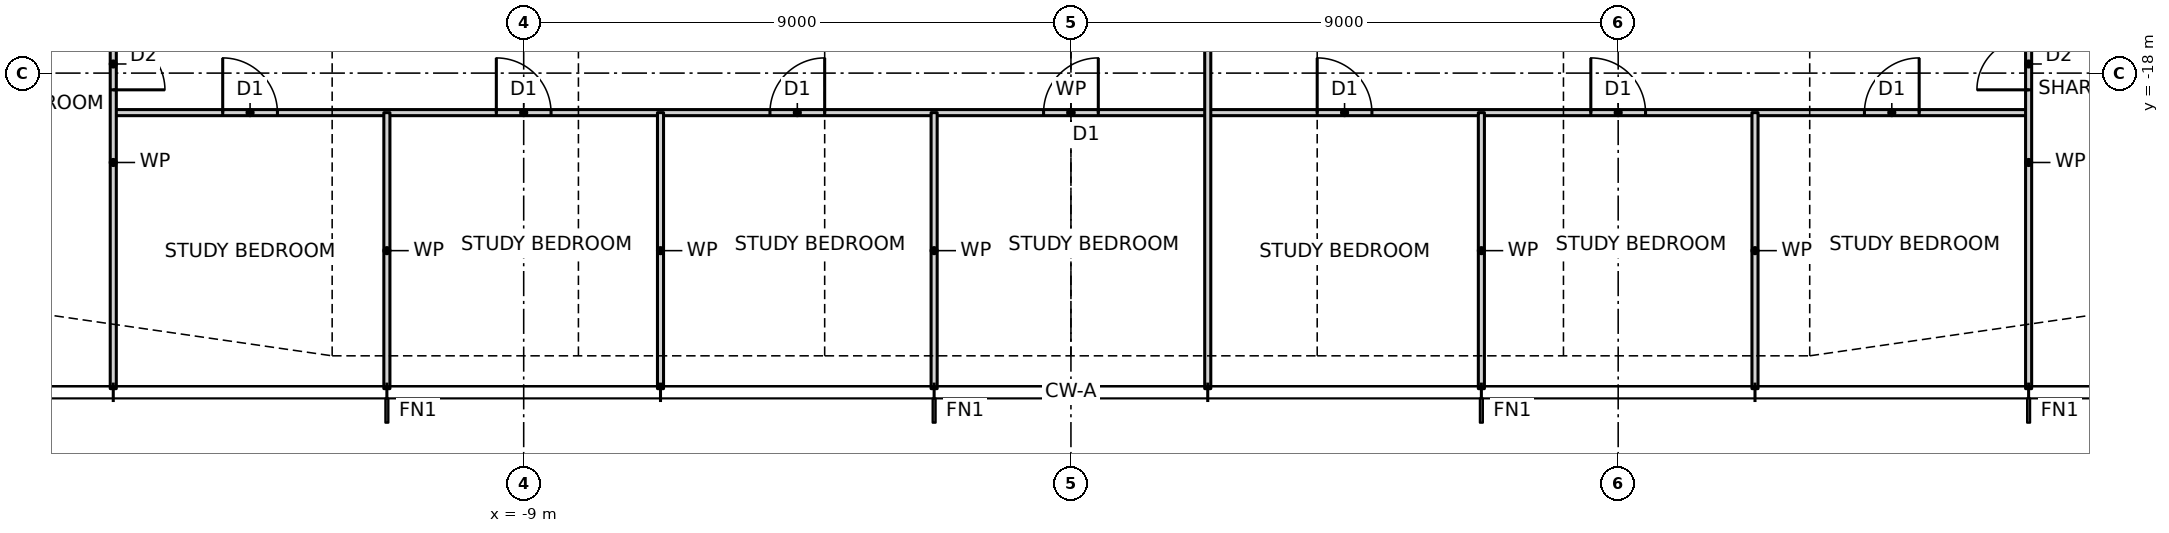
"""IFC4 building model, lengths in metres.
Left out: names, types, materials, properties, quantities, classifications, styles, units other than length and angle.
Written with IfcOpenShell. Run it as: python <this file> out.ifc"""

import sys

from ifc_helpers import new_model, si_unit, direction, frame, frame_2d, origin, place, context, subcontext, project, spatial, rectangle, extrude, element, fill, save


model = new_model("IFC4")
c1 = context("Model", 3, precision=1e-05, world=origin(), true_north=direction((0.0, 1.0)))
c2 = subcontext(c1, "Body", "Model", "MODEL_VIEW")
j1 = project(units=[si_unit("LENGTHUNIT", "METRE"), si_unit("PLANEANGLEUNIT", "RADIAN")], contexts=[c1])
p1 = place(None, origin())
s1 = spatial("IfcSite", under=j1, at=p1, CompositionType="ELEMENT")
p2 = place(p1, origin())
s2 = spatial("IfcBuilding", under=s1, at=p2, CompositionType="ELEMENT")
p3 = place(p2, frame((0.0, 0.0, 71.0)))
s3 = spatial("IfcBuildingStorey", under=s2, at=p3, CompositionType="ELEMENT", Elevation=71.0)
p4 = place(p3, frame((-15.75, -18.65, 0.0), z_axis=(0.0, 0.0, 1.0), x_axis=(1.0, 0.0, 0.0)))
e1 = element("IfcWall", 1, at=p4, inside=s3, PredefinedType="PARTITIONING", context=c2, shape_type="SweptSolid", body=[
    extrude(rectangle(XDim=31.5, YDim=0.1, at=frame_2d((15.75, 0.0))), origin(), (0.0, 0.0, 1.0), 3.2),
])
p5 = place(p4, frame((1.8, 0.0, 0.0)))
e2 = element("IfcOpeningElement", 2, at=p5, cuts=e1, PredefinedType="OPENING", context=c2, shape_type="SweptSolid", body=[
    extrude(rectangle(XDim=0.9, YDim=2.1, at=frame_2d((0.45, 1.05))), frame((0.0, 0.06, 0.0), z_axis=(0.0, -1.0, 0.0), x_axis=(1.0, 0.0, 0.0)), (0.0, 0.0, 1.0), 0.12),
])
p6 = place(p4, frame((6.3, 0.0, 0.0)))
e3 = element("IfcOpeningElement", 3, at=p6, cuts=e1, PredefinedType="OPENING", context=c2, shape_type="SweptSolid", body=[
    extrude(rectangle(XDim=0.9, YDim=2.1, at=frame_2d((0.45, 1.05))), frame((0.0, 0.06, 0.0), z_axis=(0.0, -1.0, 0.0), x_axis=(1.0, 0.0, 0.0)), (0.0, 0.0, 1.0), 0.12),
])
p7 = place(p4, frame((10.8, 0.0, 0.0)))
e4 = element("IfcOpeningElement", 4, at=p7, cuts=e1, PredefinedType="OPENING", context=c2, shape_type="SweptSolid", body=[
    extrude(rectangle(XDim=0.9, YDim=2.1, at=frame_2d((0.45, 1.05))), frame((0.0, 0.06, 0.0), z_axis=(0.0, -1.0, 0.0), x_axis=(1.0, 0.0, 0.0)), (0.0, 0.0, 1.0), 0.12),
])
p8 = place(p4, frame((15.3, 0.0, 0.0)))
e5 = element("IfcOpeningElement", 5, at=p8, cuts=e1, PredefinedType="OPENING", context=c2, shape_type="SweptSolid", body=[
    extrude(rectangle(XDim=0.9, YDim=2.1, at=frame_2d((0.45, 1.05))), frame((0.0, 0.06, 0.0), z_axis=(0.0, -1.0, 0.0), x_axis=(1.0, 0.0, 0.0)), (0.0, 0.0, 1.0), 0.12),
])
p9 = place(p4, frame((19.8, 0.0, 0.0)))
e6 = element("IfcOpeningElement", 6, at=p9, cuts=e1, PredefinedType="OPENING", context=c2, shape_type="SweptSolid", body=[
    extrude(rectangle(XDim=0.9, YDim=2.1, at=frame_2d((0.45, 1.05))), frame((0.0, 0.06, 0.0), z_axis=(0.0, -1.0, 0.0), x_axis=(1.0, 0.0, 0.0)), (0.0, 0.0, 1.0), 0.12),
])
p10 = place(p4, frame((24.3, 0.0, 0.0)))
e7 = element("IfcOpeningElement", 7, at=p10, cuts=e1, PredefinedType="OPENING", context=c2, shape_type="SweptSolid", body=[
    extrude(rectangle(XDim=0.9, YDim=2.1, at=frame_2d((0.45, 1.05))), frame((0.0, 0.06, 0.0), z_axis=(0.0, -1.0, 0.0), x_axis=(1.0, 0.0, 0.0)), (0.0, 0.0, 1.0), 0.12),
])
p11 = place(p4, frame((28.8, 0.0, 0.0)))
e8 = element("IfcOpeningElement", 8, at=p11, cuts=e1, PredefinedType="OPENING", context=c2, shape_type="SweptSolid", body=[
    extrude(rectangle(XDim=0.9, YDim=2.1, at=frame_2d((0.45, 1.05))), frame((0.0, 0.06, 0.0), z_axis=(0.0, -1.0, 0.0), x_axis=(1.0, 0.0, 0.0)), (0.0, 0.0, 1.0), 0.12),
])
p12 = place(p3, frame((15.75, -23.19, 0.0), z_axis=(0.0, 0.0, 1.0), x_axis=(0.0, 1.0, 0.0)))
e9 = element("IfcWall", 9, at=p12, inside=s3, PredefinedType="PARTITIONING", context=c2, shape_type="SweptSolid", body=[
    extrude(rectangle(XDim=7.44, YDim=0.1, at=frame_2d((3.72, 0.0))), origin(), (0.0, 0.0, 1.0), 3.2),
])
p13 = place(p12, frame((4.915, 0.0, 0.0)))
e10 = element("IfcOpeningElement", 10, at=p13, cuts=e9, PredefinedType="OPENING", context=c2, shape_type="SweptSolid", body=[
    extrude(rectangle(XDim=0.85, YDim=2.1, at=frame_2d((0.425, 1.05))), frame((0.0, 0.06, 0.0), z_axis=(0.0, -1.0, 0.0), x_axis=(1.0, 0.0, 0.0)), (0.0, 0.0, 1.0), 0.12),
])
for number, where, z_axis, x_axis in (
    (11, (11.25, -23.19, 0.0), (0.0, 0.0, 1.0), (0.0, 1.0, 0.0)),
    (12, (6.75, -23.19, 0.0), (0.0, 0.0, 1.0), (0.0, 1.0, 0.0)),
):
    element("IfcWall", number, at=place(p3, frame(where, z_axis=z_axis, x_axis=x_axis)), inside=s3, PredefinedType="PARTITIONING", context=c2, shape_type="SweptSolid", body=[
        extrude(rectangle(XDim=4.54, YDim=0.1, at=frame_2d((2.27, 0.0))), origin(), (0.0, 0.0, 1.0), 3.2),
    ])
p14 = place(p3, frame((2.25, -23.19, 0.0), z_axis=(0.0, 0.0, 1.0), x_axis=(0.0, 1.0, 0.0)))
e13 = element("IfcWall", 13, at=p14, inside=s3, PredefinedType="PARTITIONING", context=c2, shape_type="SweptSolid", body=[
    extrude(rectangle(XDim=11.59, YDim=0.1, at=frame_2d((5.795, 0.0))), origin(), (0.0, 0.0, 1.0), 3.2),
])
for number, where, z_axis, x_axis in (
    (14, (-2.25, -23.19, 0.0), (0.0, 0.0, 1.0), (0.0, 1.0, 0.0)),
    (15, (-6.75, -23.19, 0.0), (0.0, 0.0, 1.0), (0.0, 1.0, 0.0)),
    (16, (-11.25, -23.19, 0.0), (0.0, 0.0, 1.0), (0.0, 1.0, 0.0)),
):
    element("IfcWall", number, at=place(p3, frame(where, z_axis=z_axis, x_axis=x_axis)), inside=s3, PredefinedType="PARTITIONING", context=c2, shape_type="SweptSolid", body=[
        extrude(rectangle(XDim=4.54, YDim=0.1, at=frame_2d((2.27, 0.0))), origin(), (0.0, 0.0, 1.0), 3.2),
    ])
p15 = place(p3, frame((-15.75, -23.19, 0.0), z_axis=(0.0, 0.0, 1.0), x_axis=(0.0, 1.0, 0.0)))
e17 = element("IfcWall", 17, at=p15, inside=s3, PredefinedType="PARTITIONING", context=c2, shape_type="SweptSolid", body=[
    extrude(rectangle(XDim=7.44, YDim=0.1, at=frame_2d((3.72, 0.0))), origin(), (0.0, 0.0, 1.0), 3.2),
])
p16 = place(p15, frame((4.915, 0.0, 0.0)))
e18 = element("IfcOpeningElement", 18, at=p16, cuts=e17, PredefinedType="OPENING", context=c2, shape_type="SweptSolid", body=[
    extrude(rectangle(XDim=0.85, YDim=2.1, at=frame_2d((0.425, 1.05))), frame((0.0, 0.06, 0.0), z_axis=(0.0, -1.0, 0.0), x_axis=(1.0, 0.0, 0.0)), (0.0, 0.0, 1.0), 0.12),
])
p17 = place(p5, origin())
e19 = element("IfcDoor", 19, at=p17, inside=s3, OperationType="SINGLE_SWING_LEFT", PredefinedType="DOOR", context=c2, shape_type="SweptSolid", body=[
    extrude(rectangle(XDim=0.9, YDim=2.1, at=frame_2d((0.45, 1.05))), frame((0.0, 0.025, 0.0), z_axis=(0.0, -1.0, 0.0), x_axis=(1.0, 0.0, 0.0)), (0.0, 0.0, 1.0), 0.05),
])
fill(e2, e19)
p18 = place(p6, origin())
e20 = element("IfcDoor", 20, at=p18, inside=s3, OperationType="SINGLE_SWING_LEFT", PredefinedType="DOOR", context=c2, shape_type="SweptSolid", body=[
    extrude(rectangle(XDim=0.9, YDim=2.1, at=frame_2d((0.45, 1.05))), frame((0.0, 0.025, 0.0), z_axis=(0.0, -1.0, 0.0), x_axis=(1.0, 0.0, 0.0)), (0.0, 0.0, 1.0), 0.05),
])
fill(e3, e20)
p19 = place(p7, origin())
e21 = element("IfcDoor", 21, at=p19, inside=s3, OperationType="SINGLE_SWING_RIGHT", PredefinedType="DOOR", context=c2, shape_type="SweptSolid", body=[
    extrude(rectangle(XDim=0.9, YDim=2.1, at=frame_2d((0.45, 1.05))), frame((0.0, 0.025, 0.0), z_axis=(0.0, -1.0, 0.0), x_axis=(1.0, 0.0, 0.0)), (0.0, 0.0, 1.0), 0.05),
])
fill(e4, e21)
p20 = place(p8, origin())
e22 = element("IfcDoor", 22, at=p20, inside=s3, OperationType="SINGLE_SWING_RIGHT", PredefinedType="DOOR", context=c2, shape_type="SweptSolid", body=[
    extrude(rectangle(XDim=0.9, YDim=2.1, at=frame_2d((0.45, 1.05))), frame((0.0, 0.025, 0.0), z_axis=(0.0, -1.0, 0.0), x_axis=(1.0, 0.0, 0.0)), (0.0, 0.0, 1.0), 0.05),
])
fill(e5, e22)
p21 = place(p9, origin())
e23 = element("IfcDoor", 23, at=p21, inside=s3, OperationType="SINGLE_SWING_LEFT", PredefinedType="DOOR", context=c2, shape_type="SweptSolid", body=[
    extrude(rectangle(XDim=0.9, YDim=2.1, at=frame_2d((0.45, 1.05))), frame((0.0, 0.025, 0.0), z_axis=(0.0, -1.0, 0.0), x_axis=(1.0, 0.0, 0.0)), (0.0, 0.0, 1.0), 0.05),
])
fill(e6, e23)
p22 = place(p10, origin())
e24 = element("IfcDoor", 24, at=p22, inside=s3, OperationType="SINGLE_SWING_LEFT", PredefinedType="DOOR", context=c2, shape_type="SweptSolid", body=[
    extrude(rectangle(XDim=0.9, YDim=2.1, at=frame_2d((0.45, 1.05))), frame((0.0, 0.025, 0.0), z_axis=(0.0, -1.0, 0.0), x_axis=(1.0, 0.0, 0.0)), (0.0, 0.0, 1.0), 0.05),
])
fill(e7, e24)
p23 = place(p11, origin())
e25 = element("IfcDoor", 25, at=p23, inside=s3, OperationType="SINGLE_SWING_RIGHT", PredefinedType="DOOR", context=c2, shape_type="SweptSolid", body=[
    extrude(rectangle(XDim=0.9, YDim=2.1, at=frame_2d((0.45, 1.05))), frame((0.0, 0.025, 0.0), z_axis=(0.0, -1.0, 0.0), x_axis=(1.0, 0.0, 0.0)), (0.0, 0.0, 1.0), 0.05),
])
fill(e8, e25)
p24 = place(p16, frame((0.85, 0.0, 0.0), z_axis=(0.0, 0.0, 1.0), x_axis=(-1.0, 0.0, 0.0)))
e26 = element("IfcDoor", 26, at=p24, inside=s3, OperationType="SINGLE_SWING_RIGHT", PredefinedType="DOOR", context=c2, shape_type="SweptSolid", body=[
    extrude(rectangle(XDim=0.85, YDim=2.1, at=frame_2d((0.425, 1.05))), frame((0.0, 0.025, 0.0), z_axis=(0.0, -1.0, 0.0), x_axis=(1.0, 0.0, 0.0)), (0.0, 0.0, 1.0), 0.05),
])
fill(e18, e26)
p25 = place(p13, origin())
e27 = element("IfcDoor", 27, at=p25, inside=s3, OperationType="SINGLE_SWING_LEFT", PredefinedType="DOOR", context=c2, shape_type="SweptSolid", body=[
    extrude(rectangle(XDim=0.85, YDim=2.1, at=frame_2d((0.425, 1.05))), frame((0.0, 0.025, 0.0), z_axis=(0.0, -1.0, 0.0), x_axis=(1.0, 0.0, 0.0)), (0.0, 0.0, 1.0), 0.05),
])
fill(e10, e27)
save(model, sys.argv[1])
